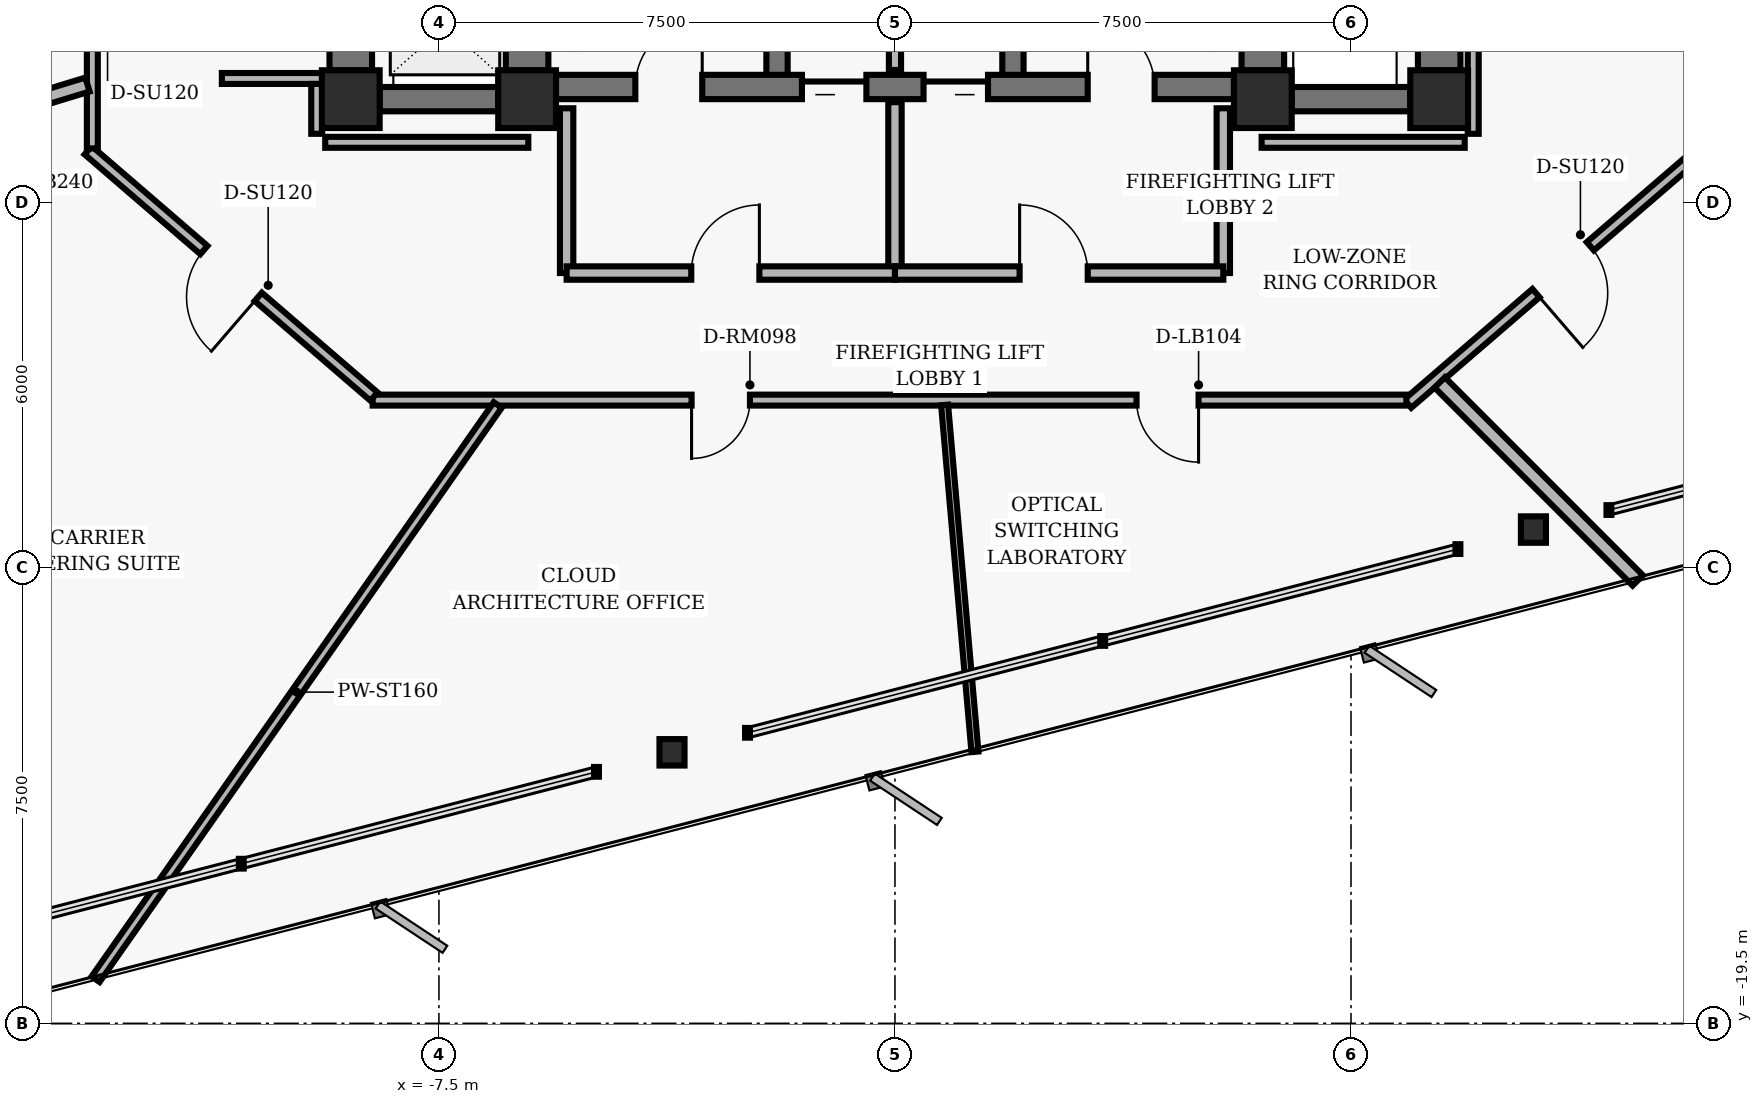
"""IFC4 building model, lengths in metres.
Left out: names, types, materials, properties, quantities, classifications, styles, units other than length and angle.
Written with IfcOpenShell. Run it as: python <this file> out.ifc"""

import sys

from ifc_helpers import new_model, si_unit, direction, frame, frame_2d, origin, origin_2d, place, context, subcontext, project, spatial, rectangle, hollow_rectangle, i_section, extrude, element, fill, save


model = new_model("IFC4")
c1 = context("Model", 3, precision=1e-05, world=origin(), true_north=direction((0.0, 1.0)))
c2 = subcontext(c1, "Body", "Model", "MODEL_VIEW")
j1 = project(units=[si_unit("LENGTHUNIT", "METRE"), si_unit("PLANEANGLEUNIT", "RADIAN")], contexts=[c1])
p1 = place(None, origin())
s1 = spatial("IfcSite", under=j1, at=p1, CompositionType="ELEMENT")
p2 = place(p1, origin())
s2 = spatial("IfcBuilding", under=s1, at=p2, CompositionType="ELEMENT")
p3 = place(p2, frame((0.0, 0.0, 91.68)))
s3 = spatial("IfcBuildingStorey", under=s2, at=p3, CompositionType="ELEMENT", Elevation=91.68)
for number, where, z_axis, x_axis in (
    (1, (-6.05, -4.3, 0.0), (0.0, 0.0, 1.0), (1.0, 0.0, 0.0)),
    (2, (6.05, -4.3, 0.0), (0.0, 0.0, 1.0), (1.0, 0.0, 0.0)),
    (3, (-8.95, -4.3, 0.0), (0.0, 0.0, 1.0), (1.0, 0.0, 0.0)),
    (4, (8.95, -4.3, 0.0), (0.0, 0.0, 1.0), (1.0, 0.0, 0.0)),
):
    element("IfcColumn", number, at=place(p3, frame(where, z_axis=z_axis, x_axis=x_axis)), inside=s3, PredefinedType="COLUMN", context=c2, shape_type="SweptSolid", body=[
        extrude(hollow_rectangle(XDim=0.95, YDim=0.95, WallThickness=0.06, InnerFilletRadius=0.02, OuterFilletRadius=0.04, at=origin_2d()), origin(), (0.0, 0.0, 1.0), 3.04),
    ])
for number, where, z_axis, x_axis in (
    (5, (-6.05, -3.825, 0.0), (0.0, 0.0, 1.0), (0.0, 1.0, 0.0)),
    (6, (6.05, -3.825, 0.0), (0.0, 0.0, 1.0), (0.0, 1.0, 0.0)),
):
    element("IfcWall", number, at=place(p3, frame(where, z_axis=z_axis, x_axis=x_axis)), inside=s3, PredefinedType="SHEAR", context=c2, shape_type="SweptSolid", body=[
        extrude(rectangle(XDim=3.35, YDim=0.7, at=frame_2d((1.675, 0.0))), origin(), (0.0, 0.0, 1.0), 2.788),
    ])
for number, where, z_axis, x_axis in (
    (7, (-1.94, -4.1, 0.0), (0.0, 0.0, 1.0), (0.0, 1.0, 0.0)),
    (8, (1.94, -4.1, 0.0), (0.0, 0.0, 1.0), (0.0, 1.0, 0.0)),
):
    element("IfcWall", number, at=place(p3, frame(where, z_axis=z_axis, x_axis=x_axis)), inside=s3, PredefinedType="SHEAR", context=c2, shape_type="SweptSolid", body=[
        extrude(rectangle(XDim=8.2, YDim=0.35, at=frame_2d((4.1, 0.0))), origin(), (0.0, 0.0, 1.0), 2.788),
    ])
p4 = place(p3, frame((-5.575, -4.1, 0.0), z_axis=(0.0, 0.0, 1.0), x_axis=(1.0, 0.0, 0.0)))
e9 = element("IfcWall", 9, at=p4, inside=s3, PredefinedType="SHEAR", context=c2, shape_type="SweptSolid", body=[
    extrude(rectangle(XDim=11.15, YDim=0.4, at=frame_2d((5.575, 0.0))), origin(), (0.0, 0.0, 1.0), 2.788),
])
p5 = place(p4, frame((1.305, 0.0, 0.0)))
e10 = element("IfcOpeningElement", 10, at=p5, cuts=e9, PredefinedType="OPENING", context=c2, shape_type="SweptSolid", body=[
    extrude(rectangle(XDim=1.1, YDim=2.04, at=frame_2d((0.55, 1.02))), frame((0.0, 0.21, 0.0), z_axis=(0.0, -1.0, 0.0), x_axis=(1.0, 0.0, 0.0)), (0.0, 0.0, 1.0), 0.42),
])
p6 = place(p4, frame((8.745, 0.0, 0.0)))
e11 = element("IfcOpeningElement", 11, at=p6, cuts=e9, PredefinedType="OPENING", context=c2, shape_type="SweptSolid", body=[
    extrude(rectangle(XDim=1.1, YDim=2.04, at=frame_2d((0.55, 1.02))), frame((0.0, 0.21, 0.0), z_axis=(0.0, -1.0, 0.0), x_axis=(1.0, 0.0, 0.0)), (0.0, 0.0, 1.0), 0.42),
])
p7 = place(p4, frame((4.045, 0.0, 0.0)))
e12 = element("IfcOpeningElement", 12, at=p7, cuts=e9, PredefinedType="OPENING", context=c2, shape_type="SweptSolid", body=[
    extrude(rectangle(XDim=1.06, YDim=2.04, at=frame_2d((0.53, 1.02))), frame((0.0, 0.21, 0.0), z_axis=(0.0, -1.0, 0.0), x_axis=(1.0, 0.0, 0.0)), (0.0, 0.0, 1.0), 0.42),
])
p8 = place(p4, frame((6.045, 0.0, 0.0)))
e13 = element("IfcOpeningElement", 13, at=p8, cuts=e9, PredefinedType="OPENING", context=c2, shape_type="SweptSolid", body=[
    extrude(rectangle(XDim=1.06, YDim=2.04, at=frame_2d((0.53, 1.02))), frame((0.0, 0.21, 0.0), z_axis=(0.0, -1.0, 0.0), x_axis=(1.0, 0.0, 0.0)), (0.0, 0.0, 1.0), 0.42),
])
p9 = place(p3, frame((-8.95, -3.825, 0.0), z_axis=(0.0, 0.0, 1.0), x_axis=(0.0, 1.0, 0.0)))
e14 = element("IfcWall", 14, at=p9, inside=s3, PredefinedType="SHEAR", context=c2, shape_type="SweptSolid", body=[
    extrude(rectangle(XDim=7.85, YDim=0.7, at=frame_2d((3.925, 0.0))), origin(), (0.0, 0.0, 1.0), 2.788),
])
p10 = place(p9, frame((0.55, 0.0, 0.0)))
e15 = element("IfcOpeningElement", 15, at=p10, cuts=e14, PredefinedType="OPENING", context=c2, shape_type="SweptSolid", body=[
    extrude(rectangle(XDim=1.06, YDim=2.04, at=frame_2d((0.53, 1.02))), frame((0.0, 0.36, 0.0), z_axis=(0.0, -1.0, 0.0), x_axis=(1.0, 0.0, 0.0)), (0.0, 0.0, 1.0), 0.72),
])
p11 = place(p9, frame((3.395, 0.0, 0.0)))
e16 = element("IfcOpeningElement", 16, at=p11, cuts=e14, PredefinedType="OPENING", context=c2, shape_type="SweptSolid", body=[
    extrude(rectangle(XDim=1.06, YDim=2.04, at=frame_2d((0.53, 1.02))), frame((0.0, 0.36, 0.0), z_axis=(0.0, -1.0, 0.0), x_axis=(1.0, 0.0, 0.0)), (0.0, 0.0, 1.0), 0.72),
])
p12 = place(p9, frame((6.23, 0.0, 0.0)))
e17 = element("IfcOpeningElement", 17, at=p12, cuts=e14, PredefinedType="OPENING", context=c2, shape_type="SweptSolid", body=[
    extrude(rectangle(XDim=1.06, YDim=2.04, at=frame_2d((0.53, 1.02))), frame((0.0, 0.36, 0.0), z_axis=(0.0, -1.0, 0.0), x_axis=(1.0, 0.0, 0.0)), (0.0, 0.0, 1.0), 0.72),
])
p13 = place(p3, frame((-8.475, -4.3, 0.0), z_axis=(0.0, 0.0, 1.0), x_axis=(1.0, 0.0, 0.0)))
e18 = element("IfcWall", 18, at=p13, inside=s3, PredefinedType="SHEAR", context=c2, shape_type="SweptSolid", body=[
    extrude(rectangle(XDim=1.95, YDim=0.4, at=frame_2d((0.975, 0.0))), origin(), (0.0, 0.0, 1.0), 2.788),
])
p14 = place(p3, frame((8.95, -3.825, 0.0), z_axis=(0.0, 0.0, 1.0), x_axis=(0.0, 1.0, 0.0)))
e19 = element("IfcWall", 19, at=p14, inside=s3, PredefinedType="SHEAR", context=c2, shape_type="SweptSolid", body=[
    extrude(rectangle(XDim=7.85, YDim=0.7, at=frame_2d((3.925, 0.0))), origin(), (0.0, 0.0, 1.0), 2.788),
])
p15 = place(p3, frame((6.525, -4.3, 0.0), z_axis=(0.0, 0.0, 1.0), x_axis=(1.0, 0.0, 0.0)))
e20 = element("IfcWall", 20, at=p15, inside=s3, PredefinedType="SHEAR", context=c2, shape_type="SweptSolid", body=[
    extrude(rectangle(XDim=1.95, YDim=0.4, at=frame_2d((0.975, 0.0))), origin(), (0.0, 0.0, 1.0), 2.788),
])
for number, where, z_axis, x_axis in (
    (21, (-3.667, -15.043, 0.0), (0.0, 0.0, 1.0), (1.0, 0.0, 0.0)),
    (22, (10.5, -11.379, 0.0), (0.0, 0.0, 1.0), (1.0, 0.0, 0.0)),
):
    element("IfcColumn", number, at=place(p3, frame(where, z_axis=z_axis, x_axis=x_axis)), inside=s3, PredefinedType="COLUMN", context=c2, shape_type="SweptSolid", body=[
        extrude(i_section(OverallWidth=0.412, OverallDepth=0.435, WebThickness=0.036, FlangeThickness=0.057, FilletRadius=0.022, at=origin_2d()), origin(), (0.0, 0.0, 1.0), 3.04),
    ])
p16 = place(p3, frame((0.0, -3.82, 0.0), z_axis=(0.0, 0.0, 1.0), x_axis=(0.0, 1.0, 0.0)))
e23 = element("IfcWall", 23, at=p16, inside=s3, PredefinedType="PARTITIONING", context=c2, shape_type="SweptSolid", body=[
    extrude(rectangle(XDim=2.67, YDim=0.2, at=frame_2d((1.335, 0.0))), origin(), (0.0, 0.0, 1.0), 2.763),
])
for number, where, z_axis, x_axis in (
    (24, (-5.4, -7.16, 0.0), (0.0, 0.0, 1.0), (0.0, 1.0, 0.0)),
    (25, (5.4, -7.16, 0.0), (0.0, 0.0, 1.0), (0.0, 1.0, 0.0)),
):
    element("IfcWall", number, at=place(p3, frame(where, z_axis=z_axis, x_axis=x_axis)), inside=s3, PredefinedType="PARTITIONING", context=c2, shape_type="SweptSolid", body=[
        extrude(rectangle(XDim=2.71, YDim=0.22, at=frame_2d((1.355, 0.0))), origin(), (0.0, 0.0, 1.0), 2.763),
    ])
p17 = place(p3, frame((0.0, -7.16, 0.0), z_axis=(0.0, 0.0, 1.0), x_axis=(0.0, 1.0, 0.0)))
e26 = element("IfcWall", 26, at=p17, inside=s3, PredefinedType="PARTITIONING", context=c2, shape_type="SweptSolid", body=[
    extrude(rectangle(XDim=2.81, YDim=0.22, at=frame_2d((1.405, 0.0))), origin(), (0.0, 0.0, 1.0), 2.763),
])
p18 = place(p3, frame((-5.4, -7.16, 0.0), z_axis=(0.0, 0.0, 1.0), x_axis=(1.0, 0.0, 0.0)))
e27 = element("IfcWall", 27, at=p18, inside=s3, PredefinedType="PARTITIONING", context=c2, shape_type="SweptSolid", body=[
    extrude(rectangle(XDim=5.4, YDim=0.22, at=frame_2d((2.7, 0.0))), origin(), (0.0, 0.0, 1.0), 2.763),
])
p19 = place(p18, frame((2.05, 0.0, 0.0)))
e28 = element("IfcOpeningElement", 28, at=p19, cuts=e27, PredefinedType="OPENING", context=c2, shape_type="SweptSolid", body=[
    extrude(rectangle(XDim=1.12, YDim=2.02, at=frame_2d((0.56, 1.01))), frame((0.0, 0.12, 0.0), z_axis=(0.0, -1.0, 0.0), x_axis=(1.0, 0.0, 0.0)), (0.0, 0.0, 1.0), 0.24),
])
p20 = place(p3, frame((0.0, -7.16, 0.0), z_axis=(0.0, 0.0, 1.0), x_axis=(1.0, 0.0, 0.0)))
e29 = element("IfcWall", 29, at=p20, inside=s3, PredefinedType="PARTITIONING", context=c2, shape_type="SweptSolid", body=[
    extrude(rectangle(XDim=5.4, YDim=0.22, at=frame_2d((2.7, 0.0))), origin(), (0.0, 0.0, 1.0), 2.763),
])
p21 = place(p20, frame((2.05, 0.0, 0.0)))
e30 = element("IfcOpeningElement", 30, at=p21, cuts=e29, PredefinedType="OPENING", context=c2, shape_type="SweptSolid", body=[
    extrude(rectangle(XDim=1.12, YDim=2.02, at=frame_2d((0.56, 1.01))), frame((0.0, 0.12, 0.0), z_axis=(0.0, -1.0, 0.0), x_axis=(1.0, 0.0, 0.0)), (0.0, 0.0, 1.0), 0.24),
])
p22 = place(p3, frame((13.268, -5.141, 0.0), z_axis=(0.0, 0.0, 1.0), x_axis=(-0.757534501725, -0.65279512766, 0.0)))
e31 = element("IfcWall", 31, at=p22, inside=s3, PredefinedType="PARTITIONING", context=c2, shape_type="SweptSolid", body=[
    extrude(rectangle(XDim=6.385, YDim=0.18, at=frame_2d((3.192, 0.0))), origin(), (0.0, 0.0, 1.0), 2.763),
])
p23 = place(p22, frame((2.418, 0.0, 0.0)))
e32 = element("IfcOpeningElement", 32, at=p23, cuts=e31, PredefinedType="OPENING", context=c2, shape_type="SweptSolid", body=[
    extrude(rectangle(XDim=1.18, YDim=2.02, at=frame_2d((0.59, 1.01))), frame((0.0, 0.1, 0.0), z_axis=(0.0, -1.0, 0.0), x_axis=(1.0, 0.0, 0.0)), (0.0, 0.0, 1.0), 0.2),
])
p24 = place(p3, frame((8.41, -9.25, 0.0), z_axis=(0.0, 0.0, 1.0), x_axis=(-1.0, 0.0, 0.0)))
e33 = element("IfcWall", 33, at=p24, inside=s3, PredefinedType="PARTITIONING", context=c2, shape_type="SweptSolid", body=[
    extrude(rectangle(XDim=17.0, YDim=0.18, at=frame_2d((8.5, 0.0))), origin(), (0.0, 0.0, 1.0), 2.277),
])
p25 = place(p24, frame((10.795, 0.0, 0.0)))
e34 = element("IfcOpeningElement", 34, at=p25, cuts=e33, PredefinedType="OPENING", context=c2, shape_type="SweptSolid", body=[
    extrude(rectangle(XDim=0.96, YDim=2.02, at=frame_2d((0.48, 1.01))), frame((0.0, 0.1, 0.0), z_axis=(0.0, -1.0, 0.0), x_axis=(1.0, 0.0, 0.0)), (0.0, 0.0, 1.0), 0.2),
])
p26 = place(p24, frame((3.417, 0.0, 0.0)))
e35 = element("IfcOpeningElement", 35, at=p26, cuts=e33, PredefinedType="OPENING", context=c2, shape_type="SweptSolid", body=[
    extrude(rectangle(XDim=1.02, YDim=2.02, at=frame_2d((0.51, 1.01))), frame((0.0, 0.1, 0.0), z_axis=(0.0, -1.0, 0.0), x_axis=(1.0, 0.0, 0.0)), (0.0, 0.0, 1.0), 0.2),
])
p27 = place(p3, frame((-8.568, -9.191, 0.0), z_axis=(0.0, 0.0, 1.0), x_axis=(-0.757556899173, 0.652769135694, 0.0)))
e36 = element("IfcWall", 36, at=p27, inside=s3, PredefinedType="PARTITIONING", context=c2, shape_type="SweptSolid", body=[
    extrude(rectangle(XDim=6.204, YDim=0.18, at=frame_2d((3.102, 0.0))), origin(), (0.0, 0.0, 1.0), 2.763),
])
p28 = place(p27, frame((2.512, 0.0, 0.0)))
e37 = element("IfcOpeningElement", 37, at=p28, cuts=e36, PredefinedType="OPENING", context=c2, shape_type="SweptSolid", body=[
    extrude(rectangle(XDim=1.18, YDim=2.02, at=frame_2d((0.59, 1.01))), frame((0.0, 0.1, 0.0), z_axis=(0.0, -1.0, 0.0), x_axis=(1.0, 0.0, 0.0)), (0.0, 0.0, 1.0), 0.2),
])
p29 = place(p3, frame((-13.2, -5.11, 0.0), z_axis=(0.0, 0.0, 1.0), x_axis=(0.0, 1.0, 0.0)))
e38 = element("IfcWall", 38, at=p29, inside=s3, PredefinedType="PARTITIONING", context=c2, shape_type="SweptSolid", body=[
    extrude(rectangle(XDim=10.22, YDim=0.18, at=frame_2d((5.11, 0.0))), origin(), (0.0, 0.0, 1.0), 2.143),
])
p30 = place(p29, frame((1.676, 0.0, 0.0)))
e39 = element("IfcOpeningElement", 39, at=p30, cuts=e38, PredefinedType="OPENING", context=c2, shape_type="SweptSolid", body=[
    extrude(rectangle(XDim=1.18, YDim=2.02, at=frame_2d((0.59, 1.01))), frame((0.0, 0.1, 0.0), z_axis=(0.0, -1.0, 0.0), x_axis=(1.0, 0.0, 0.0)), (0.0, 0.0, 1.0), 0.2),
])
p31 = place(p29, frame((5.99, 0.0, 0.0)))
e40 = element("IfcOpeningElement", 40, at=p31, cuts=e38, PredefinedType="OPENING", context=c2, shape_type="SweptSolid", body=[
    extrude(rectangle(XDim=1.18, YDim=2.02, at=frame_2d((0.59, 1.01))), frame((0.0, 0.1, 0.0), z_axis=(0.0, -1.0, 0.0), x_axis=(1.0, 0.0, 0.0)), (0.0, 0.0, 1.0), 0.2),
])
p32 = place(p3, frame((-11.07, -3.96, 0.0), z_axis=(0.0, 0.0, 1.0), x_axis=(1.0, 0.0, 0.0)))
e41 = element("IfcWall", 41, at=p32, inside=s3, PredefinedType="PARTITIONING", context=c2, shape_type="SweptSolid", body=[
    extrude(rectangle(XDim=1.65, YDim=0.18, at=frame_2d((0.825, 0.0))), origin(), (0.0, 0.0, 1.0), 2.048),
])
p33 = place(p3, frame((-9.51, -4.05, 0.0), z_axis=(0.0, 0.0, 1.0), x_axis=(0.0, -1.0, 0.0)))
e42 = element("IfcWall", 42, at=p33, inside=s3, PredefinedType="PARTITIONING", context=c2, shape_type="SweptSolid", body=[
    extrude(rectangle(XDim=0.82, YDim=0.18, at=frame_2d((0.41, 0.0))), origin(), (0.0, 0.0, 1.0), 2.763),
])
for number, where, z_axis, x_axis in (
    (43, (-9.37, -5.01, 0.0), (0.0, 0.0, 1.0), (1.0, 0.0, 0.0)),
    (44, (6.03, -5.01, 0.0), (0.0, 0.0, 1.0), (1.0, 0.0, 0.0)),
):
    element("IfcWall", number, at=place(p3, frame(where, z_axis=z_axis, x_axis=x_axis)), inside=s3, PredefinedType="PARTITIONING", context=c2, shape_type="SweptSolid", body=[
        extrude(rectangle(XDim=3.34, YDim=0.18, at=frame_2d((1.67, 0.0))), origin(), (0.0, 0.0, 1.0), 2.763),
    ])
p34 = place(p3, frame((9.51, -4.87, 0.0), z_axis=(0.0, 0.0, 1.0), x_axis=(0.0, 1.0, 0.0)))
e45 = element("IfcWall", 45, at=p34, inside=s3, PredefinedType="PARTITIONING", context=c2, shape_type="SweptSolid", body=[
    extrude(rectangle(XDim=9.74, YDim=0.18, at=frame_2d((4.87, 0.0))), origin(), (0.0, 0.0, 1.0), 2.048),
])
p35 = place(p3, frame((-13.28, -4.06, 0.0), z_axis=(0.0, 0.0, 1.0), x_axis=(-0.956289598412, -0.292421278244, 0.0)))
e46 = element("IfcWall", 46, at=p35, inside=s3, PredefinedType="PARTITIONING", context=c2, shape_type="SweptSolid", body=[
    extrude(rectangle(XDim=3.763, YDim=0.24, at=frame_2d((1.881, 0.0))), origin(), (0.0, 0.0, 1.0), 2.763),
])
p36 = place(p3, frame((-6.533, -9.33, 0.0), z_axis=(0.0, 0.0, 1.0), x_axis=(-0.573567496354, -0.81915830407, 0.0)))
e47 = element("IfcWall", 47, at=p36, inside=s3, PredefinedType="PARTITIONING", context=c2, shape_type="SweptSolid", body=[
    extrude(rectangle(XDim=11.531, YDim=0.16, at=frame_2d((5.765, 0.0))), origin(), (0.0, 0.0, 1.0), 2.763),
])
p37 = place(p3, frame((0.816, -9.33, 0.0), z_axis=(0.0, 0.0, 1.0), x_axis=(0.087137335428, -0.996196308352, 0.0)))
e48 = element("IfcWall", 48, at=p37, inside=s3, PredefinedType="MOVABLE", context=c2, shape_type="SweptSolid", body=[
    extrude(rectangle(XDim=5.727, YDim=0.115, at=frame_2d((2.863, 0.0))), origin(), (0.0, 0.0, 1.0), 2.763),
])
p38 = place(p3, frame((8.96, -8.96, 0.0), z_axis=(0.0, 0.0, 1.0), x_axis=(0.707106781187, -0.707106781187, 0.0)))
e49 = element("IfcWall", 49, at=p38, inside=s3, PredefinedType="PARTITIONING", context=c2, shape_type="SweptSolid", body=[
    extrude(rectangle(XDim=4.605, YDim=0.24, at=frame_2d((2.303, 0.0))), origin(), (0.0, 0.0, 1.0), 2.763),
])
p39 = place(p5, origin())
e50 = element("IfcDoor", 50, at=p39, inside=s3, OperationType="SINGLE_SWING_RIGHT", PredefinedType="DOOR", context=c2, shape_type="SweptSolid", body=[
    extrude(rectangle(XDim=1.1, YDim=2.04, at=frame_2d((0.55, 1.02))), frame((0.0, 0.025, 0.0), z_axis=(0.0, -1.0, 0.0), x_axis=(1.0, 0.0, 0.0)), (0.0, 0.0, 1.0), 0.05),
])
fill(e10, e50)
p40 = place(p6, origin())
e51 = element("IfcDoor", 51, at=p40, inside=s3, OperationType="SINGLE_SWING_LEFT", PredefinedType="DOOR", context=c2, shape_type="SweptSolid", body=[
    extrude(rectangle(XDim=1.1, YDim=2.04, at=frame_2d((0.55, 1.02))), frame((0.0, 0.025, 0.0), z_axis=(0.0, -1.0, 0.0), x_axis=(1.0, 0.0, 0.0)), (0.0, 0.0, 1.0), 0.05),
])
fill(e11, e51)
p41 = place(p7, origin())
e52 = element("IfcDoor", 52, at=p41, inside=s3, OperationType="SLIDING_TO_LEFT", PredefinedType="DOOR", context=c2, shape_type="SweptSolid", body=[
    extrude(rectangle(XDim=1.06, YDim=2.04, at=frame_2d((0.53, 1.02))), frame((0.0, 0.025, 0.0), z_axis=(0.0, -1.0, 0.0), x_axis=(1.0, 0.0, 0.0)), (0.0, 0.0, 1.0), 0.05),
])
fill(e12, e52)
p42 = place(p8, origin())
e53 = element("IfcDoor", 53, at=p42, inside=s3, OperationType="SLIDING_TO_RIGHT", PredefinedType="DOOR", context=c2, shape_type="SweptSolid", body=[
    extrude(rectangle(XDim=1.06, YDim=2.04, at=frame_2d((0.53, 1.02))), frame((0.0, 0.025, 0.0), z_axis=(0.0, -1.0, 0.0), x_axis=(1.0, 0.0, 0.0)), (0.0, 0.0, 1.0), 0.05),
])
fill(e13, e53)
p43 = place(p19, origin())
e54 = element("IfcDoor", 54, at=p43, inside=s3, OperationType="SINGLE_SWING_RIGHT", PredefinedType="DOOR", context=c2, shape_type="SweptSolid", body=[
    extrude(rectangle(XDim=1.12, YDim=2.02, at=frame_2d((0.56, 1.01))), frame((0.0, 0.025, 0.0), z_axis=(0.0, -1.0, 0.0), x_axis=(1.0, 0.0, 0.0)), (0.0, 0.0, 1.0), 0.05),
])
fill(e28, e54)
p44 = place(p21, origin())
e55 = element("IfcDoor", 55, at=p44, inside=s3, OperationType="SINGLE_SWING_LEFT", PredefinedType="DOOR", context=c2, shape_type="SweptSolid", body=[
    extrude(rectangle(XDim=1.12, YDim=2.02, at=frame_2d((0.56, 1.01))), frame((0.0, 0.025, 0.0), z_axis=(0.0, -1.0, 0.0), x_axis=(1.0, 0.0, 0.0)), (0.0, 0.0, 1.0), 0.05),
])
fill(e30, e55)
p45 = place(p28, origin())
e56 = element("IfcDoor", 56, at=p45, inside=s3, OperationType="SINGLE_SWING_LEFT", PredefinedType="DOOR", context=c2, shape_type="SweptSolid", body=[
    extrude(rectangle(XDim=1.18, YDim=2.02, at=frame_2d((0.59, 1.01))), frame((0.0, 0.025, 0.0), z_axis=(0.0, -1.0, 0.0), x_axis=(1.0, 0.0, 0.0)), (0.0, 0.0, 1.0), 0.05),
])
fill(e37, e56)
p46 = place(p25, origin())
e57 = element("IfcDoor", 57, at=p46, inside=s3, OperationType="SINGLE_SWING_RIGHT", PredefinedType="DOOR", context=c2, shape_type="SweptSolid", body=[
    extrude(rectangle(XDim=0.96, YDim=2.02, at=frame_2d((0.48, 1.01))), frame((0.0, 0.025, 0.0), z_axis=(0.0, -1.0, 0.0), x_axis=(1.0, 0.0, 0.0)), (0.0, 0.0, 1.0), 0.05),
])
fill(e34, e57)
p47 = place(p26, origin())
e58 = element("IfcDoor", 58, at=p47, inside=s3, OperationType="SINGLE_SWING_LEFT", PredefinedType="DOOR", context=c2, shape_type="SweptSolid", body=[
    extrude(rectangle(XDim=1.02, YDim=2.02, at=frame_2d((0.51, 1.01))), frame((0.0, 0.025, 0.0), z_axis=(0.0, -1.0, 0.0), x_axis=(1.0, 0.0, 0.0)), (0.0, 0.0, 1.0), 0.05),
])
fill(e35, e58)
p48 = place(p23, origin())
e59 = element("IfcDoor", 59, at=p48, inside=s3, OperationType="SINGLE_SWING_RIGHT", PredefinedType="DOOR", context=c2, shape_type="SweptSolid", body=[
    extrude(rectangle(XDim=1.18, YDim=2.02, at=frame_2d((0.59, 1.01))), frame((0.0, 0.025, 0.0), z_axis=(0.0, -1.0, 0.0), x_axis=(1.0, 0.0, 0.0)), (0.0, 0.0, 1.0), 0.05),
])
fill(e32, e59)
save(model, sys.argv[1])
